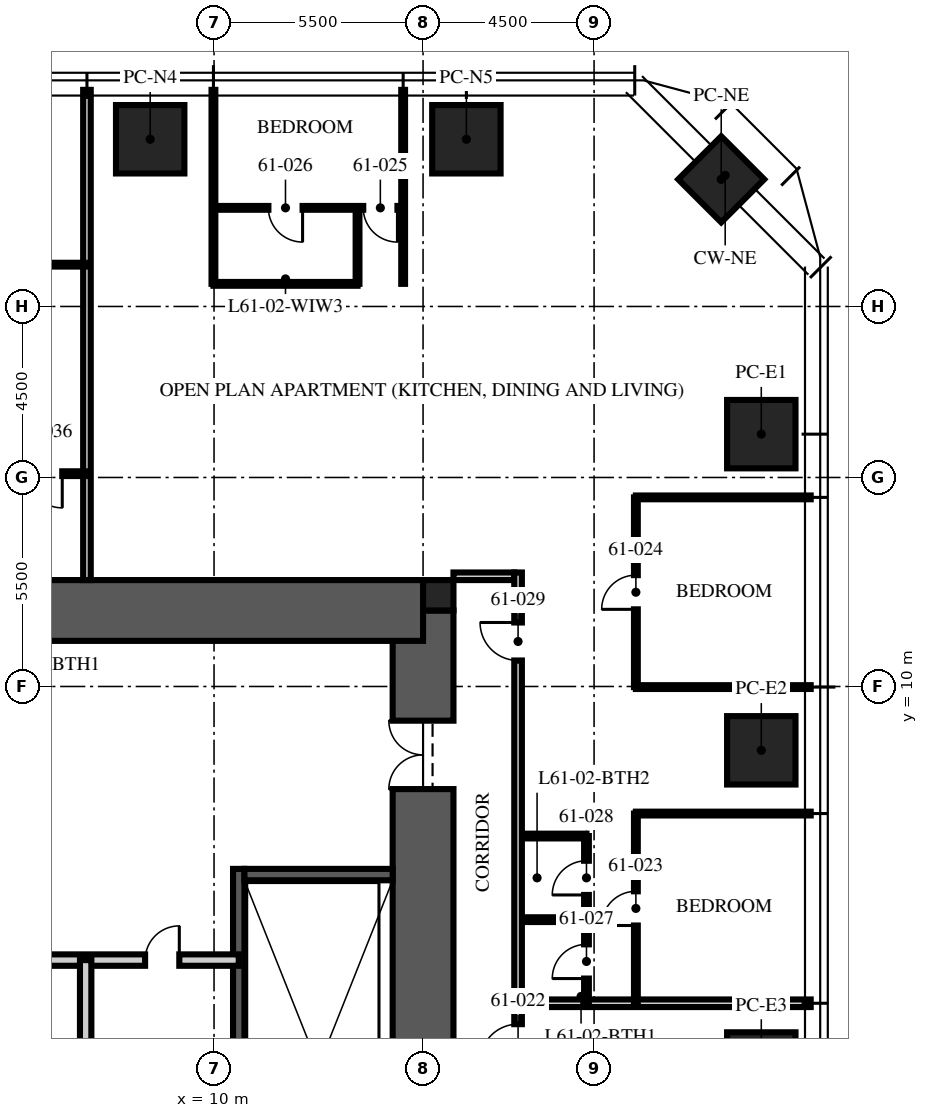
"""IFC4 building model, lengths in metres.
Left out: names, types, materials, properties, quantities, classifications, styles, units other than length and angle.
Written with IfcOpenShell. Run it as: python <this file> out.ifc"""

import sys

from ifc_helpers import new_model, si_unit, direction, frame, frame_2d, origin, origin_2d, place, context, subcontext, project, spatial, rectangle, extrude, element, fill, save


model = new_model("IFC4")
c1 = context("Model", 3, precision=1e-05, world=origin(), true_north=direction((0.0, 1.0)))
c2 = subcontext(c1, "Body", "Model", "MODEL_VIEW")
j1 = project(units=[si_unit("LENGTHUNIT", "METRE"), si_unit("PLANEANGLEUNIT", "RADIAN")], contexts=[c1])
p1 = place(None, origin())
s1 = spatial("IfcSite", under=j1, at=p1, CompositionType="ELEMENT")
p2 = place(p1, origin())
s2 = spatial("IfcBuilding", under=s1, at=p2, CompositionType="ELEMENT")
p3 = place(p2, frame((0.0, 0.0, 244.5)))
s3 = spatial("IfcBuildingStorey", under=s2, at=p3, CompositionType="ELEMENT", Elevation=244.5)
p4 = place(p3, frame((15.5, -12.0, -0.25), z_axis=(0.0, 0.0, 1.0), x_axis=(0.0, 1.0, 0.0)))
e1 = element("IfcWall", 1, at=p4, inside=s3, PredefinedType="SHEAR", context=c2, shape_type="SweptSolid", body=[
    extrude(rectangle(XDim=24.0, YDim=1.6, at=frame_2d((12.0, 0.0))), origin(), (0.0, 0.0, 1.0), 3.75),
])
p5 = place(p4, frame((3.2, 0.0, 0.25)))
e2 = element("IfcOpeningElement", 2, at=p5, cuts=e1, PredefinedType="OPENING", context=c2, shape_type="SweptSolid", body=[
    extrude(rectangle(XDim=1.2, YDim=2.1, at=frame_2d((0.6, 1.05))), frame((0.0, 0.81, 0.0), z_axis=(0.0, -1.0, 0.0), x_axis=(1.0, 0.0, 0.0)), (0.0, 0.0, 1.0), 1.62),
])
p6 = place(p4, frame((19.3, 0.0, 0.25)))
e3 = element("IfcOpeningElement", 3, at=p6, cuts=e1, PredefinedType="OPENING", context=c2, shape_type="SweptSolid", body=[
    extrude(rectangle(XDim=1.8, YDim=2.1, at=frame_2d((0.9, 1.05))), frame((0.0, 0.81, 0.0), z_axis=(0.0, -1.0, 0.0), x_axis=(1.0, 0.0, 0.0)), (0.0, 0.0, 1.0), 1.62),
])
p7 = place(p3, frame((-15.5, 12.0, -0.25), z_axis=(0.0, 0.0, 1.0), x_axis=(1.0, 0.0, 0.0)))
e4 = element("IfcWall", 4, at=p7, inside=s3, PredefinedType="SHEAR", context=c2, shape_type="SweptSolid", body=[
    extrude(rectangle(XDim=31.0, YDim=1.6, at=frame_2d((15.5, 0.0))), origin(), (0.0, 0.0, 1.0), 3.75),
])
p8 = place(p3, frame((15.9, 12.4, -0.25), z_axis=(0.0, 0.0, 1.0), x_axis=(1.0, 0.0, 0.0)))
e5 = element("IfcColumn", 5, at=p8, inside=s3, PredefinedType="COLUMN", context=c2, shape_type="SweptSolid", body=[
    extrude(rectangle(XDim=0.8, YDim=0.8, at=origin_2d()), origin(), (0.0, 0.0, 1.0), 3.75),
])
for number, where, z_axis, x_axis in (
    (6, (8.32, 24.4, 0.0), (0.0, 0.0, 1.0), (1.0, 0.0, 0.0)),
    (7, (16.64, 24.4, 0.0), (0.0, 0.0, 1.0), (1.0, 0.0, 0.0)),
    (8, (24.4, 16.64, 0.0), (0.0, 0.0, 1.0), (0.0, 1.0, 0.0)),
    (9, (24.4, 8.32, 0.0), (0.0, 0.0, 1.0), (0.0, 1.0, 0.0)),
    (10, (24.4, 0.0, 0.0), (0.0, 0.0, 1.0), (0.0, 1.0, 0.0)),
):
    element("IfcColumn", number, at=place(p3, frame(where, z_axis=z_axis, x_axis=x_axis)), inside=s3, PredefinedType="COLUMN", context=c2, shape_type="SweptSolid", body=[
        extrude(rectangle(XDim=1.8, YDim=1.8, at=origin_2d()), origin(), (0.0, 0.0, 1.0), 3.75),
    ])
p9 = place(p3, frame((23.346, 23.346, 0.0), z_axis=(0.0, 0.0, 1.0), x_axis=(0.707106781187, -0.707106781187, 0.0)))
e11 = element("IfcColumn", 11, at=p9, inside=s3, PredefinedType="COLUMN", context=c2, shape_type="SweptSolid", body=[
    extrude(rectangle(XDim=1.6, YDim=1.6, at=origin_2d()), origin(), (0.0, 0.0, 1.0), 3.75),
])
p10 = place(p3, frame((10.65, -4.9, 0.0), z_axis=(0.0, 0.0, 1.0), x_axis=(0.0, 1.0, 0.0)))
e12 = element("IfcWall", 12, at=p10, inside=s3, PredefinedType="SOLIDWALL", context=c2, shape_type="SweptSolid", body=[
    extrude(rectangle(XDim=10.1, YDim=0.3, at=frame_2d((5.05, 0.0))), origin(), (0.0, 0.0, 1.0), 3.5),
])
p11 = place(p3, frame((14.7, 5.05, 0.0), z_axis=(0.0, 0.0, 1.0), x_axis=(-1.0, 0.0, 0.0)))
e13 = element("IfcWall", 13, at=p11, inside=s3, PredefinedType="SOLIDWALL", context=c2, shape_type="SweptSolid", body=[
    extrude(rectangle(XDim=3.9, YDim=0.3, at=frame_2d((1.95, 0.0))), origin(), (0.0, 0.0, 1.0), 3.5),
])
p12 = place(p3, frame((-10.65, 2.8, 0.0), z_axis=(0.0, 0.0, 1.0), x_axis=(1.0, 0.0, 0.0)))
e14 = element("IfcWall", 14, at=p12, inside=s3, PredefinedType="PARTITIONING", context=c2, shape_type="SweptSolid", body=[
    extrude(rectangle(XDim=21.3, YDim=0.3, at=frame_2d((10.65, 0.0))), origin(), (0.0, 0.0, 1.0), 3.5),
])
p13 = place(p12, frame((10.05, 0.0, 0.0)))
e15 = element("IfcOpeningElement", 15, at=p13, cuts=e14, PredefinedType="OPENING", context=c2, shape_type="SweptSolid", body=[
    extrude(rectangle(XDim=1.2, YDim=2.1, at=frame_2d((0.6, 1.05))), frame((0.0, 0.16, 0.0), z_axis=(0.0, -1.0, 0.0), x_axis=(1.0, 0.0, 0.0)), (0.0, 0.0, 1.0), 0.32),
])
p14 = place(p12, frame((1.493, 0.0, 0.0)))
e16 = element("IfcOpeningElement", 16, at=p14, cuts=e14, PredefinedType="OPENING", context=c2, shape_type="SweptSolid", body=[
    extrude(rectangle(XDim=0.9, YDim=2.1, at=frame_2d((0.45, 1.05))), frame((0.0, 0.16, 0.0), z_axis=(0.0, -1.0, 0.0), x_axis=(1.0, 0.0, 0.0)), (0.0, 0.0, 1.0), 0.32),
])
p15 = place(p12, frame((18.836, 0.0, 0.0)))
e17 = element("IfcOpeningElement", 17, at=p15, cuts=e14, PredefinedType="OPENING", context=c2, shape_type="SweptSolid", body=[
    extrude(rectangle(XDim=0.9, YDim=2.1, at=frame_2d((0.45, 1.05))), frame((0.0, 0.16, 0.0), z_axis=(0.0, -1.0, 0.0), x_axis=(1.0, 0.0, 0.0)), (0.0, 0.0, 1.0), 0.32),
])
p16 = place(p3, frame((6.622, -6.65, 0.0), z_axis=(0.0, 0.0, 1.0), x_axis=(0.0, 1.0, 0.0)))
e18 = element("IfcWall", 18, at=p16, inside=s3, PredefinedType="PARTITIONING", context=c2, shape_type="SweptSolid", body=[
    extrude(rectangle(XDim=9.45, YDim=0.3, at=frame_2d((4.725, 0.0))), origin(), (0.0, 0.0, 1.0), 3.5),
])
p17 = place(p3, frame((16.3, 12.9, 0.0), z_axis=(0.0, 0.0, 1.0), x_axis=(1.0, 0.0, 0.0)))
e19 = element("IfcWall", 19, at=p17, inside=s3, PredefinedType="PARTITIONING", context=c2, shape_type="SweptSolid", body=[
    extrude(rectangle(XDim=1.6, YDim=0.2, at=frame_2d((0.8, 0.0))), origin(), (0.0, 0.0, 1.0), 2.3),
])
p18 = place(p3, frame((18.1, 1.664, 0.0), z_axis=(0.0, 0.0, 1.0), x_axis=(1.0, 0.0, 0.0)))
e20 = element("IfcWall", 20, at=p18, inside=s3, PredefinedType="PARTITIONING", context=c2, shape_type="SweptSolid", body=[
    extrude(rectangle(XDim=7.6, YDim=0.2, at=frame_2d((3.8, 0.0))), origin(), (0.0, 0.0, 1.0), 2.91),
])
for number, where, z_axis, x_axis in (
    (21, (21.1, 6.656, 0.0), (0.0, 0.0, 1.0), (1.0, 0.0, 0.0)),
    (22, (21.1, 9.984, 0.0), (0.0, 0.0, 1.0), (1.0, 0.0, 0.0)),
    (23, (21.1, 14.976, 0.0), (0.0, 0.0, 1.0), (1.0, 0.0, 0.0)),
):
    element("IfcWall", number, at=place(p3, frame(where, z_axis=z_axis, x_axis=x_axis)), inside=s3, PredefinedType="PARTITIONING", context=c2, shape_type="SweptSolid", body=[
        extrude(rectangle(XDim=4.6, YDim=0.1, at=frame_2d((2.3, 0.0))), origin(), (0.0, 0.0, 1.0), 2.91),
    ])
for number, where, z_axis, x_axis in (
    (24, (14.976, 20.595, 0.0), (0.0, 0.0, 1.0), (0.0, 1.0, 0.0)),
    (25, (9.984, 20.595, 0.0), (0.0, 0.0, 1.0), (0.0, 1.0, 0.0)),
):
    element("IfcWall", number, at=place(p3, frame(where, z_axis=z_axis, x_axis=x_axis)), inside=s3, PredefinedType="PARTITIONING", context=c2, shape_type="SweptSolid", body=[
        extrude(rectangle(XDim=5.105, YDim=0.1, at=frame_2d((2.552, 0.0))), origin(), (0.0, 0.0, 1.0), 2.91),
    ])
p19 = place(p3, frame((6.656, 12.8, 0.0), z_axis=(0.0, 0.0, 1.0), x_axis=(0.0, 1.0, 0.0)))
e26 = element("IfcWall", 26, at=p19, inside=s3, PredefinedType="PARTITIONING", context=c2, shape_type="SweptSolid", body=[
    extrude(rectangle(XDim=12.9, YDim=0.2, at=frame_2d((6.45, 0.0))), origin(), (0.0, 0.0, 1.0), 2.91),
])
p20 = place(p3, frame((21.1, 1.664, 0.0), z_axis=(0.0, 0.0, 1.0), x_axis=(0.0, 1.0, 0.0)))
e27 = element("IfcWall", 27, at=p20, inside=s3, PredefinedType="PARTITIONING", context=c2, shape_type="SweptSolid", body=[
    extrude(rectangle(XDim=4.992, YDim=0.1, at=frame_2d((2.496, 0.0))), origin(), (0.0, 0.0, 1.0), 2.81),
])
p21 = place(p20, frame((2.046, 0.0, 0.0)))
e28 = element("IfcOpeningElement", 28, at=p21, cuts=e27, PredefinedType="OPENING", context=c2, shape_type="SweptSolid", body=[
    extrude(rectangle(XDim=0.9, YDim=2.1, at=frame_2d((0.45, 1.05))), frame((0.0, 0.06, 0.0), z_axis=(0.0, -1.0, 0.0), x_axis=(1.0, 0.0, 0.0)), (0.0, 0.0, 1.0), 0.12),
])
p22 = place(p3, frame((21.1, 9.984, 0.0), z_axis=(0.0, 0.0, 1.0), x_axis=(0.0, 1.0, 0.0)))
e29 = element("IfcWall", 29, at=p22, inside=s3, PredefinedType="PARTITIONING", context=c2, shape_type="SweptSolid", body=[
    extrude(rectangle(XDim=4.992, YDim=0.1, at=frame_2d((2.496, 0.0))), origin(), (0.0, 0.0, 1.0), 2.81),
])
p23 = place(p22, frame((2.046, 0.0, 0.0)))
e30 = element("IfcOpeningElement", 30, at=p23, cuts=e29, PredefinedType="OPENING", context=c2, shape_type="SweptSolid", body=[
    extrude(rectangle(XDim=0.9, YDim=2.1, at=frame_2d((0.45, 1.05))), frame((0.0, 0.06, 0.0), z_axis=(0.0, -1.0, 0.0), x_axis=(1.0, 0.0, 0.0)), (0.0, 0.0, 1.0), 0.12),
])
p24 = place(p3, frame((14.976, 22.595, 0.0), z_axis=(0.0, 0.0, 1.0), x_axis=(-1.0, 0.0, 0.0)))
e31 = element("IfcWall", 31, at=p24, inside=s3, PredefinedType="PARTITIONING", context=c2, shape_type="SweptSolid", body=[
    extrude(rectangle(XDim=4.992, YDim=0.1, at=frame_2d((2.496, 0.0))), origin(), (0.0, 0.0, 1.0), 2.81),
])
p25 = place(p24, frame((0.15, 0.0, 0.0)))
e32 = element("IfcOpeningElement", 32, at=p25, cuts=e31, PredefinedType="OPENING", context=c2, shape_type="SweptSolid", body=[
    extrude(rectangle(XDim=0.9, YDim=2.1, at=frame_2d((0.45, 1.05))), frame((0.0, 0.06, 0.0), z_axis=(0.0, -1.0, 0.0), x_axis=(1.0, 0.0, 0.0)), (0.0, 0.0, 1.0), 0.12),
])
p26 = place(p24, frame((2.646, 0.0, 0.0)))
e33 = element("IfcOpeningElement", 33, at=p26, cuts=e31, PredefinedType="OPENING", context=c2, shape_type="SweptSolid", body=[
    extrude(rectangle(XDim=0.9, YDim=2.1, at=frame_2d((0.45, 1.05))), frame((0.0, 0.06, 0.0), z_axis=(0.0, -1.0, 0.0), x_axis=(1.0, 0.0, 0.0)), (0.0, 0.0, 1.0), 0.12),
])
p27 = place(p3, frame((13.776, 20.595, 0.0), z_axis=(0.0, 0.0, 1.0), x_axis=(0.0, 1.0, 0.0)))
e34 = element("IfcWall", 34, at=p27, inside=s3, PredefinedType="PARTITIONING", context=c2, shape_type="SweptSolid", body=[
    extrude(rectangle(XDim=2.0, YDim=0.1, at=frame_2d((1.0, 0.0))), origin(), (0.0, 0.0, 1.0), 3.5),
])
p28 = place(p3, frame((13.776, 20.595, 0.0), z_axis=(0.0, 0.0, 1.0), x_axis=(-1.0, 0.0, 0.0)))
e35 = element("IfcWall", 35, at=p28, inside=s3, PredefinedType="PARTITIONING", context=c2, shape_type="SweptSolid", body=[
    extrude(rectangle(XDim=3.792, YDim=0.1, at=frame_2d((1.896, 0.0))), origin(), (0.0, 0.0, 1.0), 2.81),
])
p29 = place(p3, frame((19.8, 1.664, 0.0), z_axis=(0.0, 0.0, 1.0), x_axis=(0.0, 1.0, 0.0)))
e36 = element("IfcWall", 36, at=p29, inside=s3, PredefinedType="PARTITIONING", context=c2, shape_type="SweptSolid", body=[
    extrude(rectangle(XDim=4.4, YDim=0.125, at=frame_2d((2.2, 0.0))), origin(), (0.0, 0.0, 1.0), 2.81),
])
p30 = place(p29, frame((0.65, 0.0, 0.0)))
e37 = element("IfcOpeningElement", 37, at=p30, cuts=e36, PredefinedType="OPENING", context=c2, shape_type="SweptSolid", body=[
    extrude(rectangle(XDim=0.9, YDim=2.1, at=frame_2d((0.45, 1.05))), frame((0.0, 0.073, 0.0), z_axis=(0.0, -1.0, 0.0), x_axis=(1.0, 0.0, 0.0)), (0.0, 0.0, 1.0), 0.145),
])
p31 = place(p29, frame((2.85, 0.0, 0.0)))
e38 = element("IfcOpeningElement", 38, at=p31, cuts=e36, PredefinedType="OPENING", context=c2, shape_type="SweptSolid", body=[
    extrude(rectangle(XDim=0.9, YDim=2.1, at=frame_2d((0.45, 1.05))), frame((0.0, 0.073, 0.0), z_axis=(0.0, -1.0, 0.0), x_axis=(1.0, 0.0, 0.0)), (0.0, 0.0, 1.0), 0.145),
])
for number, where, z_axis, x_axis in (
    (39, (18.1, 3.864, 0.0), (0.0, 0.0, 1.0), (1.0, 0.0, 0.0)),
    (40, (18.1, 6.064, 0.0), (0.0, 0.0, 1.0), (1.0, 0.0, 0.0)),
):
    element("IfcWall", number, at=place(p3, frame(where, z_axis=z_axis, x_axis=x_axis)), inside=s3, PredefinedType="PARTITIONING", context=c2, shape_type="SweptSolid", body=[
        extrude(rectangle(XDim=1.7, YDim=0.125, at=frame_2d((0.85, 0.0))), origin(), (0.0, 0.0, 1.0), 3.5),
    ])
p32 = place(p3, frame((6.656, 21.1, 0.0), z_axis=(0.0, 0.0, 1.0), x_axis=(-1.0, 0.0, 0.0)))
e41 = element("IfcWall", 41, at=p32, inside=s3, PredefinedType="PARTITIONING", context=c2, shape_type="SweptSolid", body=[
    extrude(rectangle(XDim=4.992, YDim=0.1, at=frame_2d((2.496, 0.0))), origin(), (0.0, 0.0, 1.0), 2.81),
])
p33 = place(p32, frame((2.046, 0.0, 0.0)))
e42 = element("IfcOpeningElement", 42, at=p33, cuts=e41, PredefinedType="OPENING", context=c2, shape_type="SweptSolid", body=[
    extrude(rectangle(XDim=0.9, YDim=2.1, at=frame_2d((0.45, 1.05))), frame((0.0, 0.06, 0.0), z_axis=(0.0, -1.0, 0.0), x_axis=(1.0, 0.0, 0.0)), (0.0, 0.0, 1.0), 0.12),
])
p34 = place(p3, frame((6.656, 15.6, 0.0), z_axis=(0.0, 0.0, 1.0), x_axis=(-1.0, 0.0, 0.0)))
e43 = element("IfcWall", 43, at=p34, inside=s3, PredefinedType="PARTITIONING", context=c2, shape_type="SweptSolid", body=[
    extrude(rectangle(XDim=4.0, YDim=0.125, at=frame_2d((2.0, 0.0))), origin(), (0.0, 0.0, 1.0), 2.81),
])
p35 = place(p34, frame((0.65, 0.0, 0.0)))
e44 = element("IfcOpeningElement", 44, at=p35, cuts=e43, PredefinedType="OPENING", context=c2, shape_type="SweptSolid", body=[
    extrude(rectangle(XDim=0.9, YDim=2.1, at=frame_2d((0.45, 1.05))), frame((0.0, 0.073, 0.0), z_axis=(0.0, -1.0, 0.0), x_axis=(1.0, 0.0, 0.0)), (0.0, 0.0, 1.0), 0.145),
])
p36 = place(p34, frame((2.65, 0.0, 0.0)))
e45 = element("IfcOpeningElement", 45, at=p36, cuts=e43, PredefinedType="OPENING", context=c2, shape_type="SweptSolid", body=[
    extrude(rectangle(XDim=0.9, YDim=2.1, at=frame_2d((0.45, 1.05))), frame((0.0, 0.073, 0.0), z_axis=(0.0, -1.0, 0.0), x_axis=(1.0, 0.0, 0.0)), (0.0, 0.0, 1.0), 0.145),
])
p37 = place(p3, frame((18.0, -13.0, 0.0), z_axis=(0.0, 0.0, 1.0), x_axis=(0.0, 1.0, 0.0)))
e46 = element("IfcWall", 46, at=p37, inside=s3, PredefinedType="PARTITIONING", context=c2, shape_type="SweptSolid", body=[
    extrude(rectangle(XDim=26.0, YDim=0.2, at=frame_2d((13.0, 0.0))), origin(), (0.0, 0.0, 1.0), 2.6),
])
p38 = place(p37, frame((13.114, 0.0, 0.0)))
e47 = element("IfcOpeningElement", 47, at=p38, cuts=e46, PredefinedType="OPENING", context=c2, shape_type="SweptSolid", body=[
    extrude(rectangle(XDim=1.0, YDim=2.2, at=frame_2d((0.5, 1.1))), frame((0.0, 0.11, 0.0), z_axis=(0.0, -1.0, 0.0), x_axis=(1.0, 0.0, 0.0)), (0.0, 0.0, 1.0), 0.22),
])
p39 = place(p37, frame((23.684, 0.0, 0.0)))
e48 = element("IfcOpeningElement", 48, at=p39, cuts=e46, PredefinedType="OPENING", context=c2, shape_type="SweptSolid", body=[
    extrude(rectangle(XDim=1.0, YDim=2.2, at=frame_2d((0.5, 1.1))), frame((0.0, 0.11, 0.0), z_axis=(0.0, -1.0, 0.0), x_axis=(1.0, 0.0, 0.0)), (0.0, 0.0, 1.0), 0.22),
])
p40 = place(p37, frame((4.6, 0.0, 0.0)))
e49 = element("IfcOpeningElement", 49, at=p40, cuts=e46, PredefinedType="OPENING", context=c2, shape_type="SweptSolid", body=[
    extrude(rectangle(XDim=1.0, YDim=2.2, at=frame_2d((0.5, 1.1))), frame((0.0, 0.11, 0.0), z_axis=(0.0, -1.0, 0.0), x_axis=(1.0, 0.0, 0.0)), (0.0, 0.0, 1.0), 0.22),
])
p41 = place(p6, origin())
e50 = element("IfcDoor", 50, at=p41, inside=s3, OperationType="DOUBLE_DOOR_SINGLE_SWING", PredefinedType="DOOR", context=c2, shape_type="SweptSolid", body=[
    extrude(rectangle(XDim=1.8, YDim=2.1, at=frame_2d((0.9, 1.05))), frame((0.0, 0.025, 0.0), z_axis=(0.0, -1.0, 0.0), x_axis=(1.0, 0.0, 0.0)), (0.0, 0.0, 1.0), 0.05),
])
fill(e3, e50)
p42 = place(p15, origin())
e51 = element("IfcDoor", 51, at=p42, inside=s3, OperationType="SINGLE_SWING_RIGHT", PredefinedType="DOOR", context=c2, shape_type="SweptSolid", body=[
    extrude(rectangle(XDim=0.9, YDim=2.1, at=frame_2d((0.45, 1.05))), frame((0.0, 0.025, 0.0), z_axis=(0.0, -1.0, 0.0), x_axis=(1.0, 0.0, 0.0)), (0.0, 0.0, 1.0), 0.05),
])
fill(e17, e51)
p43 = place(p38, origin())
e52 = element("IfcDoor", 52, at=p43, inside=s3, OperationType="SINGLE_SWING_LEFT", PredefinedType="DOOR", context=c2, shape_type="SweptSolid", body=[
    extrude(rectangle(XDim=1.0, YDim=2.2, at=frame_2d((0.5, 1.1))), frame((0.0, 0.025, 0.0), z_axis=(0.0, -1.0, 0.0), x_axis=(1.0, 0.0, 0.0)), (0.0, 0.0, 1.0), 0.05),
])
fill(e47, e52)
p44 = place(p21, origin())
e53 = element("IfcDoor", 53, at=p44, inside=s3, OperationType="SINGLE_SWING_LEFT", PredefinedType="DOOR", context=c2, shape_type="SweptSolid", body=[
    extrude(rectangle(XDim=0.9, YDim=2.1, at=frame_2d((0.45, 1.05))), frame((0.0, 0.025, 0.0), z_axis=(0.0, -1.0, 0.0), x_axis=(1.0, 0.0, 0.0)), (0.0, 0.0, 1.0), 0.05),
])
fill(e28, e53)
p45 = place(p23, origin())
e54 = element("IfcDoor", 54, at=p45, inside=s3, OperationType="SINGLE_SWING_LEFT", PredefinedType="DOOR", context=c2, shape_type="SweptSolid", body=[
    extrude(rectangle(XDim=0.9, YDim=2.1, at=frame_2d((0.45, 1.05))), frame((0.0, 0.025, 0.0), z_axis=(0.0, -1.0, 0.0), x_axis=(1.0, 0.0, 0.0)), (0.0, 0.0, 1.0), 0.05),
])
fill(e30, e54)
p46 = place(p25, origin())
e55 = element("IfcDoor", 55, at=p46, inside=s3, OperationType="SINGLE_SWING_LEFT", PredefinedType="DOOR", context=c2, shape_type="SweptSolid", body=[
    extrude(rectangle(XDim=0.9, YDim=2.1, at=frame_2d((0.45, 1.05))), frame((0.0, 0.025, 0.0), z_axis=(0.0, -1.0, 0.0), x_axis=(1.0, 0.0, 0.0)), (0.0, 0.0, 1.0), 0.05),
])
fill(e32, e55)
p47 = place(p26, origin())
e56 = element("IfcDoor", 56, at=p47, inside=s3, OperationType="SINGLE_SWING_LEFT", PredefinedType="DOOR", context=c2, shape_type="SweptSolid", body=[
    extrude(rectangle(XDim=0.9, YDim=2.1, at=frame_2d((0.45, 1.05))), frame((0.0, 0.025, 0.0), z_axis=(0.0, -1.0, 0.0), x_axis=(1.0, 0.0, 0.0)), (0.0, 0.0, 1.0), 0.05),
])
fill(e33, e56)
p48 = place(p30, origin())
e57 = element("IfcDoor", 57, at=p48, inside=s3, OperationType="SINGLE_SWING_LEFT", PredefinedType="DOOR", context=c2, shape_type="SweptSolid", body=[
    extrude(rectangle(XDim=0.9, YDim=2.1, at=frame_2d((0.45, 1.05))), frame((0.0, 0.025, 0.0), z_axis=(0.0, -1.0, 0.0), x_axis=(1.0, 0.0, 0.0)), (0.0, 0.0, 1.0), 0.05),
])
fill(e37, e57)
p49 = place(p31, origin())
e58 = element("IfcDoor", 58, at=p49, inside=s3, OperationType="SINGLE_SWING_LEFT", PredefinedType="DOOR", context=c2, shape_type="SweptSolid", body=[
    extrude(rectangle(XDim=0.9, YDim=2.1, at=frame_2d((0.45, 1.05))), frame((0.0, 0.025, 0.0), z_axis=(0.0, -1.0, 0.0), x_axis=(1.0, 0.0, 0.0)), (0.0, 0.0, 1.0), 0.05),
])
fill(e38, e58)
p50 = place(p39, origin())
e59 = element("IfcDoor", 59, at=p50, inside=s3, OperationType="SINGLE_SWING_RIGHT", PredefinedType="DOOR", context=c2, shape_type="SweptSolid", body=[
    extrude(rectangle(XDim=1.0, YDim=2.2, at=frame_2d((0.5, 1.1))), frame((0.0, 0.025, 0.0), z_axis=(0.0, -1.0, 0.0), x_axis=(1.0, 0.0, 0.0)), (0.0, 0.0, 1.0), 0.05),
])
fill(e48, e59)
p51 = place(p35, origin())
e60 = element("IfcDoor", 60, at=p51, inside=s3, OperationType="SINGLE_SWING_LEFT", PredefinedType="DOOR", context=c2, shape_type="SweptSolid", body=[
    extrude(rectangle(XDim=0.9, YDim=2.1, at=frame_2d((0.45, 1.05))), frame((0.0, 0.025, 0.0), z_axis=(0.0, -1.0, 0.0), x_axis=(1.0, 0.0, 0.0)), (0.0, 0.0, 1.0), 0.05),
])
fill(e44, e60)
save(model, sys.argv[1])
